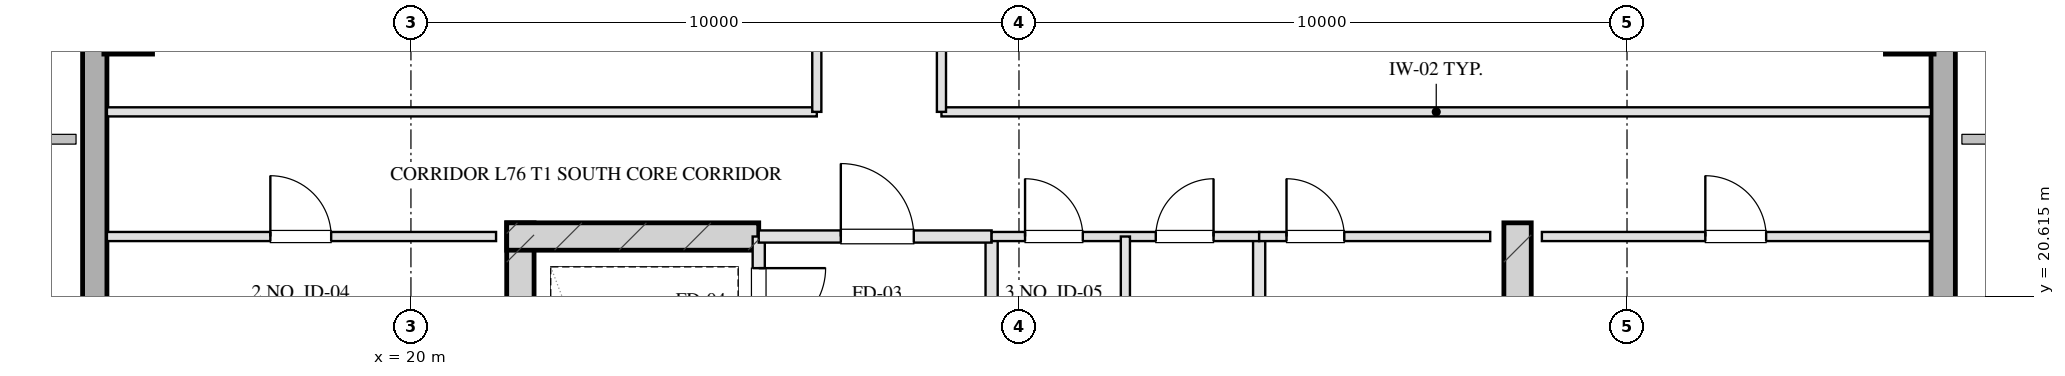
"""IFC4 building model, lengths in metres.
Left out: names, types, materials, properties, quantities, classifications, styles, units other than length and angle.
Written with IfcOpenShell. Run it as: python <this file> out.ifc"""

import sys

from ifc_helpers import new_model, si_unit, direction, frame, frame_2d, origin, origin_2d, place, context, subcontext, project, spatial, rectangle, hollow_rectangle, extrude, element, fill, save


model = new_model("IFC4")
c1 = context("Model", 3, precision=1e-05, world=origin(), true_north=direction((0.0, 1.0)))
c2 = subcontext(c1, "Body", "Model", "MODEL_VIEW")
j1 = project(units=[si_unit("LENGTHUNIT", "METRE"), si_unit("PLANEANGLEUNIT", "RADIAN")], contexts=[c1])
p1 = place(None, origin())
s1 = spatial("IfcSite", under=j1, at=p1, CompositionType="ELEMENT")
p2 = place(p1, origin())
s2 = spatial("IfcBuilding", under=s1, at=p2, CompositionType="ELEMENT")
p3 = place(p2, frame((0.0, 0.0, 276.0)))
s3 = spatial("IfcBuildingStorey", under=s2, at=p3, CompositionType="ELEMENT", Elevation=276.0)
for number, where, z_axis, x_axis in (
    (1, (21.8, 21.825, 0.0), (0.0, 0.0, 1.0), (0.0, -1.0, 0.0)),
    (2, (38.2, 21.825, 0.0), (0.0, 0.0, 1.0), (0.0, -1.0, 0.0)),
):
    element("IfcWall", number, at=place(p3, frame(where, z_axis=z_axis, x_axis=x_axis)), inside=s3, PredefinedType="SHEAR", context=c2, shape_type="SweptSolid", body=[
        extrude(rectangle(XDim=9.33, YDim=0.45, at=frame_2d((4.665, 0.0))), origin(), (0.0, 0.0, 1.0), 4.2),
    ])
p4 = place(p3, frame((21.575, 21.6, 0.0), z_axis=(0.0, 0.0, 1.0), x_axis=(1.0, 0.0, 0.0)))
e3 = element("IfcWall", 3, at=p4, inside=s3, PredefinedType="SHEAR", context=c2, shape_type="SweptSolid", body=[
    extrude(rectangle(XDim=4.145, YDim=0.45, at=frame_2d((2.073, 0.0))), origin(), (0.0, 0.0, 1.0), 4.2),
])
for number, where, z_axis, x_axis in (
    (4, (15.35, 25.0, 0.0), (0.0, 0.0, 1.0), (1.0, 0.0, 0.0)),
    (5, (44.65, 25.0, 0.0), (0.0, 0.0, 1.0), (1.0, 0.0, 0.0)),
):
    element("IfcColumn", number, at=place(p3, frame(where, z_axis=z_axis, x_axis=x_axis)), inside=s3, PredefinedType="COLUMN", context=c2, shape_type="SweptSolid", body=[
        extrude(hollow_rectangle(XDim=0.8, YDim=0.8, WallThickness=0.028, at=origin_2d()), origin(), (0.0, 0.0, 1.0), 4.201),
    ])
p5 = place(p3, frame((14.8, 13.1, 0.0), z_axis=(0.0, 0.0, 1.0), x_axis=(0.0, 1.0, 0.0)))
e6 = element("IfcWall", 6, at=p5, inside=s3, PredefinedType="SOLIDWALL", context=c2, shape_type="SweptSolid", body=[
    extrude(rectangle(XDim=41.8, YDim=0.4, at=frame_2d((20.9, 0.0))), origin(), (0.0, 0.0, 1.0), 3.33),
])
p6 = place(p5, frame((22.525, 0.0, 0.75)))
e7 = element("IfcOpeningElement", 7, at=p6, cuts=e6, PredefinedType="OPENING", context=c2, shape_type="SweptSolid", body=[
    extrude(rectangle(XDim=1.95, YDim=1.65, at=frame_2d((0.975, 0.825))), frame((0.0, 0.21, 0.0), z_axis=(0.0, -1.0, 0.0), x_axis=(1.0, 0.0, 0.0)), (0.0, 0.0, 1.0), 0.42),
])
p7 = place(p5, frame((26.325, 0.0, 0.75)))
e8 = element("IfcOpeningElement", 8, at=p7, cuts=e6, PredefinedType="OPENING", context=c2, shape_type="SweptSolid", body=[
    extrude(rectangle(XDim=1.95, YDim=1.65, at=frame_2d((0.975, 0.825))), frame((0.0, 0.21, 0.0), z_axis=(0.0, -1.0, 0.0), x_axis=(1.0, 0.0, 0.0)), (0.0, 0.0, 1.0), 0.42),
])
p8 = place(p5, frame((17.25, 0.0, 0.0)))
e9 = element("IfcOpeningElement", 9, at=p8, cuts=e6, PredefinedType="OPENING", context=c2, shape_type="SweptSolid", body=[
    extrude(rectangle(XDim=1.1, YDim=2.15, at=frame_2d((0.55, 1.075))), frame((0.0, 0.21, 0.0), z_axis=(0.0, -1.0, 0.0), x_axis=(1.0, 0.0, 0.0)), (0.0, 0.0, 1.0), 0.42),
])
p9 = place(p3, frame((45.2, 54.9, 0.0), z_axis=(0.0, 0.0, 1.0), x_axis=(0.0, -1.0, 0.0)))
e10 = element("IfcWall", 10, at=p9, inside=s3, PredefinedType="SOLIDWALL", context=c2, shape_type="SweptSolid", body=[
    extrude(rectangle(XDim=41.8, YDim=0.4, at=frame_2d((20.9, 0.0))), origin(), (0.0, 0.0, 1.0), 3.33),
])
p10 = place(p9, frame((17.325, 0.0, 0.75)))
e11 = element("IfcOpeningElement", 11, at=p10, cuts=e10, PredefinedType="OPENING", context=c2, shape_type="SweptSolid", body=[
    extrude(rectangle(XDim=1.95, YDim=1.65, at=frame_2d((0.975, 0.825))), frame((0.0, 0.21, 0.0), z_axis=(0.0, -1.0, 0.0), x_axis=(1.0, 0.0, 0.0)), (0.0, 0.0, 1.0), 0.42),
])
p11 = place(p9, frame((13.525, 0.0, 0.75)))
e12 = element("IfcOpeningElement", 12, at=p11, cuts=e10, PredefinedType="OPENING", context=c2, shape_type="SweptSolid", body=[
    extrude(rectangle(XDim=1.95, YDim=1.65, at=frame_2d((0.975, 0.825))), frame((0.0, 0.21, 0.0), z_axis=(0.0, -1.0, 0.0), x_axis=(1.0, 0.0, 0.0)), (0.0, 0.0, 1.0), 0.42),
])
p12 = place(p9, frame((26.15, 0.0, 0.0)))
e13 = element("IfcOpeningElement", 13, at=p12, cuts=e10, PredefinedType="OPENING", context=c2, shape_type="SweptSolid", body=[
    extrude(rectangle(XDim=1.1, YDim=2.15, at=frame_2d((0.55, 1.075))), frame((0.0, 0.21, 0.0), z_axis=(0.0, -1.0, 0.0), x_axis=(1.0, 0.0, 0.0)), (0.0, 0.0, 1.0), 0.42),
])
p13 = place(p3, frame((25.72, 21.6, 0.0), z_axis=(0.0, 0.0, 1.0), x_axis=(0.0, -1.0, 0.0)))
e14 = element("IfcWall", 14, at=p13, inside=s3, PredefinedType="PARTITIONING", context=c2, shape_type="SweptSolid", body=[
    extrude(rectangle(XDim=1.9, YDim=0.2, at=frame_2d((0.95, 0.0))), origin(), (0.0, 0.0, 1.0), 3.925),
])
p14 = place(p13, frame((0.52, 0.0, 0.0)))
e15 = element("IfcOpeningElement", 15, at=p14, cuts=e14, PredefinedType="OPENING", context=c2, shape_type="SweptSolid", body=[
    extrude(rectangle(XDim=1.1, YDim=2.05, at=frame_2d((0.55, 1.025))), frame((0.0, 0.11, 0.0), z_axis=(0.0, -1.0, 0.0), x_axis=(1.0, 0.0, 0.0)), (0.0, 0.0, 1.0), 0.22),
])
p15 = place(p3, frame((29.55, 21.6, 0.0), z_axis=(0.0, 0.0, 1.0), x_axis=(0.0, -1.0, 0.0)))
e16 = element("IfcWall", 16, at=p15, inside=s3, PredefinedType="PARTITIONING", context=c2, shape_type="SweptSolid", body=[
    extrude(rectangle(XDim=8.43, YDim=0.2, at=frame_2d((4.215, 0.0))), origin(), (0.0, 0.0, 1.0), 3.925),
])
p16 = place(p3, frame((25.72, 21.6, 0.0), z_axis=(0.0, 0.0, 1.0), x_axis=(1.0, 0.0, 0.0)))
e17 = element("IfcWall", 17, at=p16, inside=s3, PredefinedType="PARTITIONING", context=c2, shape_type="SweptSolid", body=[
    extrude(rectangle(XDim=3.83, YDim=0.2, at=frame_2d((1.915, 0.0))), origin(), (0.0, 0.0, 1.0), 3.925),
])
p17 = place(p16, frame((1.35, 0.0, 0.0)))
e18 = element("IfcOpeningElement", 18, at=p17, cuts=e17, PredefinedType="OPENING", context=c2, shape_type="SweptSolid", body=[
    extrude(rectangle(XDim=1.2, YDim=2.05, at=frame_2d((0.6, 1.025))), frame((0.0, 0.11, 0.0), z_axis=(0.0, -1.0, 0.0), x_axis=(1.0, 0.0, 0.0)), (0.0, 0.0, 1.0), 0.22),
])
p18 = place(p3, frame((33.95, 21.6, 0.0), z_axis=(0.0, 0.0, 1.0), x_axis=(0.0, -1.0, 0.0)))
e19 = element("IfcWall", 19, at=p18, inside=s3, PredefinedType="PARTITIONING", context=c2, shape_type="SweptSolid", body=[
    extrude(rectangle(XDim=8.43, YDim=0.2, at=frame_2d((4.215, 0.0))), origin(), (0.0, 0.0, 1.0), 3.925),
])
p19 = place(p3, frame((29.55, 21.6, 0.0), z_axis=(0.0, 0.0, 1.0), x_axis=(1.0, 0.0, 0.0)))
e20 = element("IfcWall", 20, at=p19, inside=s3, PredefinedType="PARTITIONING", context=c2, shape_type="SweptSolid", body=[
    extrude(rectangle(XDim=4.4, YDim=0.15, at=frame_2d((2.2, 0.0))), origin(), (0.0, 0.0, 1.0), 3.925),
])
p20 = place(p19, frame((0.55, 0.0, 0.0)))
e21 = element("IfcOpeningElement", 21, at=p20, cuts=e20, PredefinedType="OPENING", context=c2, shape_type="SweptSolid", body=[
    extrude(rectangle(XDim=0.95, YDim=2.05, at=frame_2d((0.475, 1.025))), frame((0.0, 0.085, 0.0), z_axis=(0.0, -1.0, 0.0), x_axis=(1.0, 0.0, 0.0)), (0.0, 0.0, 1.0), 0.17),
])
p21 = place(p19, frame((2.7, 0.0, 0.0)))
e22 = element("IfcOpeningElement", 22, at=p21, cuts=e20, PredefinedType="OPENING", context=c2, shape_type="SweptSolid", body=[
    extrude(rectangle(XDim=0.95, YDim=2.05, at=frame_2d((0.475, 1.025))), frame((0.0, 0.085, 0.0), z_axis=(0.0, -1.0, 0.0), x_axis=(1.0, 0.0, 0.0)), (0.0, 0.0, 1.0), 0.17),
])
p22 = place(p3, frame((31.75, 21.6, 0.0), z_axis=(0.0, 0.0, 1.0), x_axis=(0.0, -1.0, 0.0)))
e23 = element("IfcWall", 23, at=p22, inside=s3, PredefinedType="PARTITIONING", context=c2, shape_type="SweptSolid", body=[
    extrude(rectangle(XDim=8.43, YDim=0.15, at=frame_2d((4.215, 0.0))), origin(), (0.0, 0.0, 1.0), 3.925),
])
p23 = place(p3, frame((33.95, 21.6, 0.0), z_axis=(0.0, 0.0, 1.0), x_axis=(1.0, 0.0, 0.0)))
e24 = element("IfcWall", 24, at=p23, inside=s3, PredefinedType="PARTITIONING", context=c2, shape_type="SweptSolid", body=[
    extrude(rectangle(XDim=3.8, YDim=0.15, at=frame_2d((1.9, 0.0))), origin(), (0.0, 0.0, 1.0), 3.925),
])
p24 = place(p23, frame((0.45, 0.0, 0.0)))
e25 = element("IfcOpeningElement", 25, at=p24, cuts=e24, PredefinedType="OPENING", context=c2, shape_type="SweptSolid", body=[
    extrude(rectangle(XDim=0.95, YDim=2.05, at=frame_2d((0.475, 1.025))), frame((0.0, 0.085, 0.0), z_axis=(0.0, -1.0, 0.0), x_axis=(1.0, 0.0, 0.0)), (0.0, 0.0, 1.0), 0.17),
])
p25 = place(p3, frame((15.0, 21.6, 0.0), z_axis=(0.0, 0.0, 1.0), x_axis=(1.0, 0.0, 0.0)))
e26 = element("IfcWall", 26, at=p25, inside=s3, PredefinedType="PARTITIONING", context=c2, shape_type="SweptSolid", body=[
    extrude(rectangle(XDim=6.4, YDim=0.15, at=frame_2d((3.2, 0.0))), origin(), (0.0, 0.0, 1.0), 3.925),
])
p26 = place(p25, frame((2.688, 0.0, 0.0)))
e27 = element("IfcOpeningElement", 27, at=p26, cuts=e26, PredefinedType="OPENING", context=c2, shape_type="SweptSolid", body=[
    extrude(rectangle(XDim=1.0, YDim=2.05, at=frame_2d((0.5, 1.025))), frame((0.0, 0.085, 0.0), z_axis=(0.0, -1.0, 0.0), x_axis=(1.0, 0.0, 0.0)), (0.0, 0.0, 1.0), 0.17),
])
p27 = place(p3, frame((38.6, 21.6, 0.0), z_axis=(0.0, 0.0, 1.0), x_axis=(1.0, 0.0, 0.0)))
e28 = element("IfcWall", 28, at=p27, inside=s3, PredefinedType="PARTITIONING", context=c2, shape_type="SweptSolid", body=[
    extrude(rectangle(XDim=6.4, YDim=0.15, at=frame_2d((3.2, 0.0))), origin(), (0.0, 0.0, 1.0), 3.925),
])
p28 = place(p27, frame((2.688, 0.0, 0.0)))
e29 = element("IfcOpeningElement", 29, at=p28, cuts=e28, PredefinedType="OPENING", context=c2, shape_type="SweptSolid", body=[
    extrude(rectangle(XDim=1.0, YDim=2.05, at=frame_2d((0.5, 1.025))), frame((0.0, 0.085, 0.0), z_axis=(0.0, -1.0, 0.0), x_axis=(1.0, 0.0, 0.0)), (0.0, 0.0, 1.0), 0.17),
])
p29 = place(p3, frame((15.0, 23.65, 0.0), z_axis=(0.0, 0.0, 1.0), x_axis=(1.0, 0.0, 0.0)))
e30 = element("IfcWall", 30, at=p29, inside=s3, PredefinedType="PARTITIONING", context=c2, shape_type="SweptSolid", body=[
    extrude(rectangle(XDim=11.675, YDim=0.15, at=frame_2d((5.837, 0.0))), origin(), (0.0, 0.0, 1.0), 3.925),
])
p30 = place(p3, frame((28.725, 23.65, 0.0), z_axis=(0.0, 0.0, 1.0), x_axis=(1.0, 0.0, 0.0)))
e31 = element("IfcWall", 31, at=p30, inside=s3, PredefinedType="PARTITIONING", context=c2, shape_type="SweptSolid", body=[
    extrude(rectangle(XDim=16.275, YDim=0.15, at=frame_2d((8.137, 0.0))), origin(), (0.0, 0.0, 1.0), 3.925),
])
p31 = place(p3, frame((26.675, 23.65, 0.0), z_axis=(0.0, 0.0, 1.0), x_axis=(0.0, 1.0, 0.0)))
e32 = element("IfcWall", 32, at=p31, inside=s3, PredefinedType="PARTITIONING", context=c2, shape_type="SweptSolid", body=[
    extrude(rectangle(XDim=20.7, YDim=0.15, at=frame_2d((10.35, 0.0))), origin(), (0.0, 0.0, 1.0), 3.925),
])
p32 = place(p31, frame((2.175, 0.0, 0.0)))
e33 = element("IfcOpeningElement", 33, at=p32, cuts=e32, PredefinedType="OPENING", context=c2, shape_type="SweptSolid", body=[
    extrude(rectangle(XDim=1.0, YDim=2.05, at=frame_2d((0.5, 1.025))), frame((0.0, 0.085, 0.0), z_axis=(0.0, -1.0, 0.0), x_axis=(1.0, 0.0, 0.0)), (0.0, 0.0, 1.0), 0.17),
])
p33 = place(p31, frame((6.999, 0.0, 0.0)))
e34 = element("IfcOpeningElement", 34, at=p33, cuts=e32, PredefinedType="OPENING", context=c2, shape_type="SweptSolid", body=[
    extrude(rectangle(XDim=1.05, YDim=2.05, at=frame_2d((0.525, 1.025))), frame((0.0, 0.085, 0.0), z_axis=(0.0, -1.0, 0.0), x_axis=(1.0, 0.0, 0.0)), (0.0, 0.0, 1.0), 0.17),
])
p34 = place(p31, frame((11.838, 0.0, 0.0)))
e35 = element("IfcOpeningElement", 35, at=p34, cuts=e32, PredefinedType="OPENING", context=c2, shape_type="SweptSolid", body=[
    extrude(rectangle(XDim=1.0, YDim=2.05, at=frame_2d((0.5, 1.025))), frame((0.0, 0.085, 0.0), z_axis=(0.0, -1.0, 0.0), x_axis=(1.0, 0.0, 0.0)), (0.0, 0.0, 1.0), 0.17),
])
p35 = place(p31, frame((17.365, 0.0, 0.0)))
e36 = element("IfcOpeningElement", 36, at=p35, cuts=e32, PredefinedType="OPENING", context=c2, shape_type="SweptSolid", body=[
    extrude(rectangle(XDim=1.0, YDim=2.05, at=frame_2d((0.5, 1.025))), frame((0.0, 0.085, 0.0), z_axis=(0.0, -1.0, 0.0), x_axis=(1.0, 0.0, 0.0)), (0.0, 0.0, 1.0), 0.17),
])
p36 = place(p3, frame((28.725, 23.65, 0.0), z_axis=(0.0, 0.0, 1.0), x_axis=(0.0, 1.0, 0.0)))
e37 = element("IfcWall", 37, at=p36, inside=s3, PredefinedType="PARTITIONING", context=c2, shape_type="SweptSolid", body=[
    extrude(rectangle(XDim=20.7, YDim=0.15, at=frame_2d((10.35, 0.0))), origin(), (0.0, 0.0, 1.0), 3.925),
])
p37 = place(p36, frame((2.675, 0.0, 0.0)))
e38 = element("IfcOpeningElement", 38, at=p37, cuts=e37, PredefinedType="OPENING", context=c2, shape_type="SweptSolid", body=[
    extrude(rectangle(XDim=0.85, YDim=2.05, at=frame_2d((0.425, 1.025))), frame((0.0, 0.085, 0.0), z_axis=(0.0, -1.0, 0.0), x_axis=(1.0, 0.0, 0.0)), (0.0, 0.0, 1.0), 0.17),
])
p38 = place(p36, frame((9.857, 0.0, 0.0)))
e39 = element("IfcOpeningElement", 39, at=p38, cuts=e37, PredefinedType="OPENING", context=c2, shape_type="SweptSolid", body=[
    extrude(rectangle(XDim=1.0, YDim=2.05, at=frame_2d((0.5, 1.025))), frame((0.0, 0.085, 0.0), z_axis=(0.0, -1.0, 0.0), x_axis=(1.0, 0.0, 0.0)), (0.0, 0.0, 1.0), 0.17),
])
p39 = place(p36, frame((17.032, 0.0, 0.0)))
e40 = element("IfcOpeningElement", 40, at=p39, cuts=e37, PredefinedType="OPENING", context=c2, shape_type="SweptSolid", body=[
    extrude(rectangle(XDim=1.0, YDim=2.05, at=frame_2d((0.5, 1.025))), frame((0.0, 0.085, 0.0), z_axis=(0.0, -1.0, 0.0), x_axis=(1.0, 0.0, 0.0)), (0.0, 0.0, 1.0), 0.17),
])
p40 = place(p14, origin())
e41 = element("IfcDoor", 41, at=p40, inside=s3, OperationType="SINGLE_SWING_LEFT", PredefinedType="DOOR", context=c2, shape_type="SweptSolid", body=[
    extrude(rectangle(XDim=1.1, YDim=2.05, at=frame_2d((0.55, 1.025))), frame((0.0, 0.025, 0.0), z_axis=(0.0, -1.0, 0.0), x_axis=(1.0, 0.0, 0.0)), (0.0, 0.0, 1.0), 0.05),
])
fill(e15, e41)
p41 = place(p17, origin())
e42 = element("IfcDoor", 42, at=p41, inside=s3, OperationType="SINGLE_SWING_LEFT", PredefinedType="DOOR", context=c2, shape_type="SweptSolid", body=[
    extrude(rectangle(XDim=1.2, YDim=2.05, at=frame_2d((0.6, 1.025))), frame((0.0, 0.025, 0.0), z_axis=(0.0, -1.0, 0.0), x_axis=(1.0, 0.0, 0.0)), (0.0, 0.0, 1.0), 0.05),
])
fill(e18, e42)
p42 = place(p20, origin())
e43 = element("IfcDoor", 43, at=p42, inside=s3, OperationType="SINGLE_SWING_LEFT", PredefinedType="DOOR", context=c2, shape_type="SweptSolid", body=[
    extrude(rectangle(XDim=0.95, YDim=2.05, at=frame_2d((0.475, 1.025))), frame((0.0, 0.025, 0.0), z_axis=(0.0, -1.0, 0.0), x_axis=(1.0, 0.0, 0.0)), (0.0, 0.0, 1.0), 0.05),
])
fill(e21, e43)
p43 = place(p21, origin())
e44 = element("IfcDoor", 44, at=p43, inside=s3, OperationType="SINGLE_SWING_RIGHT", PredefinedType="DOOR", context=c2, shape_type="SweptSolid", body=[
    extrude(rectangle(XDim=0.95, YDim=2.05, at=frame_2d((0.475, 1.025))), frame((0.0, 0.025, 0.0), z_axis=(0.0, -1.0, 0.0), x_axis=(1.0, 0.0, 0.0)), (0.0, 0.0, 1.0), 0.05),
])
fill(e22, e44)
p44 = place(p24, origin())
e45 = element("IfcDoor", 45, at=p44, inside=s3, OperationType="SINGLE_SWING_LEFT", PredefinedType="DOOR", context=c2, shape_type="SweptSolid", body=[
    extrude(rectangle(XDim=0.95, YDim=2.05, at=frame_2d((0.475, 1.025))), frame((0.0, 0.025, 0.0), z_axis=(0.0, -1.0, 0.0), x_axis=(1.0, 0.0, 0.0)), (0.0, 0.0, 1.0), 0.05),
])
fill(e25, e45)
p45 = place(p26, origin())
e46 = element("IfcDoor", 46, at=p45, inside=s3, OperationType="SINGLE_SWING_LEFT", PredefinedType="DOOR", context=c2, shape_type="SweptSolid", body=[
    extrude(rectangle(XDim=1.0, YDim=2.05, at=frame_2d((0.5, 1.025))), frame((0.0, 0.025, 0.0), z_axis=(0.0, -1.0, 0.0), x_axis=(1.0, 0.0, 0.0)), (0.0, 0.0, 1.0), 0.05),
])
fill(e27, e46)
p46 = place(p28, origin())
e47 = element("IfcDoor", 47, at=p46, inside=s3, OperationType="SINGLE_SWING_LEFT", PredefinedType="DOOR", context=c2, shape_type="SweptSolid", body=[
    extrude(rectangle(XDim=1.0, YDim=2.05, at=frame_2d((0.5, 1.025))), frame((0.0, 0.025, 0.0), z_axis=(0.0, -1.0, 0.0), x_axis=(1.0, 0.0, 0.0)), (0.0, 0.0, 1.0), 0.05),
])
fill(e29, e47)
save(model, sys.argv[1])
